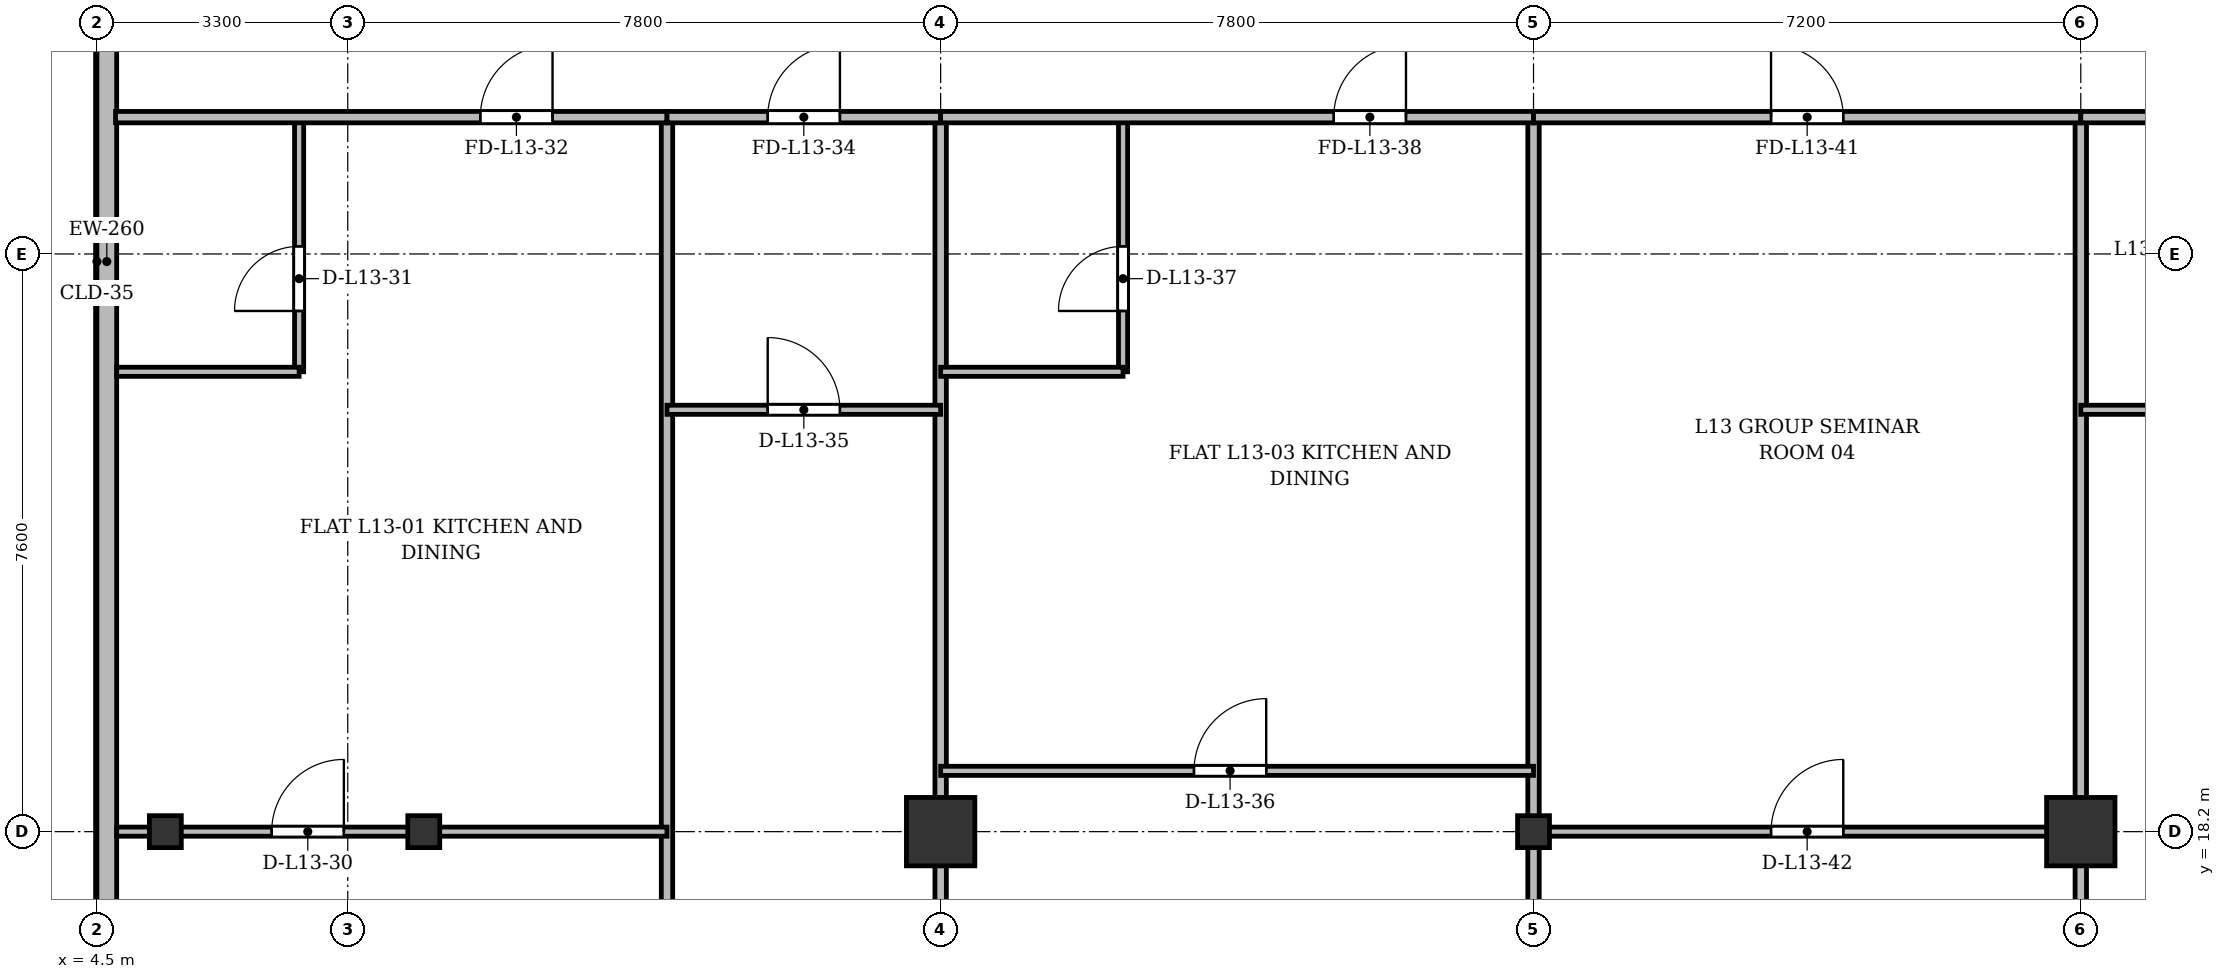
"""IFC4 building model, lengths in metres.
Left out: names, types, materials, properties, quantities, classifications, styles, units other than length and angle.
Written with IfcOpenShell. Run it as: python <this file> out.ifc"""

import sys

from ifc_helpers import new_model, si_unit, direction, frame, frame_2d, origin, origin_2d, place, context, subcontext, project, spatial, rectangle, i_section, extrude, source, transform, mapped, element, fill, save


model = new_model("IFC4")
c1 = context("Model", 3, precision=1e-05, world=origin(), true_north=direction((0.0, 1.0)))
c2 = subcontext(c1, "Body", "Model", "MODEL_VIEW")
j1 = project(units=[si_unit("LENGTHUNIT", "METRE"), si_unit("PLANEANGLEUNIT", "RADIAN")], contexts=[c1])
p1 = place(None, origin())
s1 = spatial("IfcSite", under=j1, at=p1, CompositionType="ELEMENT")
p2 = place(p1, origin())
s2 = spatial("IfcBuilding", under=s1, at=p2, CompositionType="ELEMENT")
p3 = place(p2, frame((0.0, 0.0, 52.3)))
s3 = spatial("IfcBuildingStorey", under=s2, at=p3, CompositionType="ELEMENT", Elevation=52.3)
m1 = source(origin(), c2, "Body", "SweptSolid", [
    extrude(i_section(OverallWidth=0.42, OverallDepth=0.42, WebThickness=0.026, FlangeThickness=0.04, at=origin_2d()), origin(), (0.0, 0.0, 1.0), 3.6),
])
for number, where, z_axis, x_axis in (
    (1, (5.4, 18.2, 0.0), (0.0, 0.0, 1.0), (1.0, 0.0, 0.0)),
    (2, (8.8, 18.2, 0.0), (0.0, 0.0, 1.0), (1.0, 0.0, 0.0)),
):
    element("IfcColumn", number, at=place(p3, frame(where, z_axis=z_axis, x_axis=x_axis)), inside=s3, PredefinedType="COLUMN", context=c2, shape_type="MappedRepresentation", body=[
        mapped(m1, transform((0.0, 0.0, 0.0), x_axis=(1.0, 0.0, 0.0), y_axis=(0.0, 1.0, 0.0), z_axis=(0.0, 0.0, 1.0), scale=1.0)),
    ])
m2 = source(origin(), c2, "Body", "SweptSolid", [
    extrude(rectangle(XDim=0.9, YDim=0.9, at=origin_2d()), origin(), (0.0, 0.0, 1.0), 3.6),
])
p4 = place(p3, frame((15.6, 18.2, 0.0), z_axis=(0.0, 0.0, 1.0), x_axis=(1.0, 0.0, 0.0)))
e3 = element("IfcColumn", 3, at=p4, inside=s3, PredefinedType="COLUMN", context=c2, shape_type="MappedRepresentation", body=[
    mapped(m2, transform((0.0, 0.0, 0.0), x_axis=(1.0, 0.0, 0.0), y_axis=(0.0, 1.0, 0.0), z_axis=(0.0, 0.0, 1.0), scale=1.0)),
])
p5 = place(p3, frame((23.4, 18.2, 0.0), z_axis=(0.0, 0.0, 1.0), x_axis=(1.0, 0.0, 0.0)))
e4 = element("IfcColumn", 4, at=p5, inside=s3, PredefinedType="COLUMN", context=c2, shape_type="MappedRepresentation", body=[
    mapped(m1, transform((0.0, 0.0, 0.0), x_axis=(1.0, 0.0, 0.0), y_axis=(0.0, 1.0, 0.0), z_axis=(0.0, 0.0, 1.0), scale=1.0)),
])
p6 = place(p3, frame((30.6, 18.2, 0.0), z_axis=(0.0, 0.0, 1.0), x_axis=(1.0, 0.0, 0.0)))
e5 = element("IfcColumn", 5, at=p6, inside=s3, PredefinedType="COLUMN", context=c2, shape_type="MappedRepresentation", body=[
    mapped(m2, transform((0.0, 0.0, 0.0), x_axis=(1.0, 0.0, 0.0), y_axis=(0.0, 1.0, 0.0), z_axis=(0.0, 0.0, 1.0), scale=1.0)),
])
p7 = place(p3, frame((4.63, 5.9, 0.0), z_axis=(0.0, 0.0, 1.0), x_axis=(0.0, 1.0, 0.0)))
e6 = element("IfcWall", 6, at=p7, inside=s3, PredefinedType="SOLIDWALL", context=c2, shape_type="SweptSolid", body=[
    extrude(rectangle(XDim=39.6, YDim=0.26, at=frame_2d((19.8, 0.0))), origin(), (0.0, 0.0, 1.0), 3.34),
])
p8 = place(p7, frame((1.45, 0.0, 0.92)))
e7 = element("IfcOpeningElement", 7, at=p8, cuts=e6, PredefinedType="OPENING", context=c2, shape_type="SweptSolid", body=[
    extrude(rectangle(XDim=1.2, YDim=1.65, at=frame_2d((0.6, 0.825))), frame((0.0, 0.14, 0.0), z_axis=(0.0, -1.0, 0.0), x_axis=(1.0, 0.0, 0.0)), (0.0, 0.0, 1.0), 0.28),
])
p9 = place(p7, frame((4.3, 0.0, 0.92)))
e8 = element("IfcOpeningElement", 8, at=p9, cuts=e6, PredefinedType="OPENING", context=c2, shape_type="SweptSolid", body=[
    extrude(rectangle(XDim=2.4, YDim=2.1, at=frame_2d((1.2, 1.05))), frame((0.0, 0.14, 0.0), z_axis=(0.0, -1.0, 0.0), x_axis=(1.0, 0.0, 0.0)), (0.0, 0.0, 1.0), 0.28),
])
p10 = place(p7, frame((8.5, 0.0, 0.92)))
e9 = element("IfcOpeningElement", 9, at=p10, cuts=e6, PredefinedType="OPENING", context=c2, shape_type="SweptSolid", body=[
    extrude(rectangle(XDim=2.4, YDim=2.1, at=frame_2d((1.2, 1.05))), frame((0.0, 0.14, 0.0), z_axis=(0.0, -1.0, 0.0), x_axis=(1.0, 0.0, 0.0)), (0.0, 0.0, 1.0), 0.28),
])
p11 = place(p7, frame((29.7, 0.0, 0.92)))
e10 = element("IfcOpeningElement", 10, at=p11, cuts=e6, PredefinedType="OPENING", context=c2, shape_type="SweptSolid", body=[
    extrude(rectangle(XDim=2.4, YDim=2.1, at=frame_2d((1.2, 1.05))), frame((0.0, 0.14, 0.0), z_axis=(0.0, -1.0, 0.0), x_axis=(1.0, 0.0, 0.0)), (0.0, 0.0, 1.0), 0.28),
])
p12 = place(p7, frame((33.9, 0.0, 0.92)))
e11 = element("IfcOpeningElement", 11, at=p12, cuts=e6, PredefinedType="OPENING", context=c2, shape_type="SweptSolid", body=[
    extrude(rectangle(XDim=1.2, YDim=1.65, at=frame_2d((0.6, 0.825))), frame((0.0, 0.14, 0.0), z_axis=(0.0, -1.0, 0.0), x_axis=(1.0, 0.0, 0.0)), (0.0, 0.0, 1.0), 0.28),
])
p13 = place(p7, frame((37.25, 0.0, 0.92)))
e12 = element("IfcOpeningElement", 12, at=p13, cuts=e6, PredefinedType="OPENING", context=c2, shape_type="SweptSolid", body=[
    extrude(rectangle(XDim=1.2, YDim=1.65, at=frame_2d((0.6, 0.825))), frame((0.0, 0.14, 0.0), z_axis=(0.0, -1.0, 0.0), x_axis=(1.0, 0.0, 0.0)), (0.0, 0.0, 1.0), 0.28),
])
p14 = place(p3, frame((12.0, 3.145, 0.0), z_axis=(0.0, 0.0, 1.0), x_axis=(0.0, 1.0, 0.0)))
e13 = element("IfcWall", 13, at=p14, inside=s3, PredefinedType="PARTITIONING", context=c2, shape_type="SweptSolid", body=[
    extrude(rectangle(XDim=24.455, YDim=0.15, at=frame_2d((12.228, 0.0))), origin(), (0.0, 0.0, 1.0), 2.69),
])
for number, where, z_axis, x_axis in (
    (14, (15.6, 3.145, 0.0), (0.0, 0.0, 1.0), (0.0, 1.0, 0.0)),
    (15, (23.4, 3.145, 0.0), (0.0, 0.0, 1.0), (0.0, 1.0, 0.0)),
    (16, (30.6, 3.145, 0.0), (0.0, 0.0, 1.0), (0.0, 1.0, 0.0)),
):
    element("IfcWall", number, at=place(p3, frame(where, z_axis=z_axis, x_axis=x_axis)), inside=s3, PredefinedType="PARTITIONING", context=c2, shape_type="SweptSolid", body=[
        extrude(rectangle(XDim=24.455, YDim=0.15, at=frame_2d((12.228, 0.0))), origin(), (0.0, 0.0, 1.0), 2.752),
    ])
p15 = place(p3, frame((4.76, 18.2, 0.0), z_axis=(0.0, 0.0, 1.0), x_axis=(1.0, 0.0, 0.0)))
e17 = element("IfcWall", 17, at=p15, inside=s3, PredefinedType="PARTITIONING", context=c2, shape_type="SweptSolid", body=[
    extrude(rectangle(XDim=7.24, YDim=0.12, at=frame_2d((3.62, 0.0))), origin(), (0.0, 0.0, 1.0), 2.69),
])
p16 = place(p15, frame((2.039, 0.0, 0.0)))
e18 = element("IfcOpeningElement", 18, at=p16, cuts=e17, PredefinedType="OPENING", context=c2, shape_type="SweptSolid", body=[
    extrude(rectangle(XDim=0.95, YDim=2.15, at=frame_2d((0.475, 1.075))), frame((0.0, 0.07, 0.0), z_axis=(0.0, -1.0, 0.0), x_axis=(1.0, 0.0, 0.0)), (0.0, 0.0, 1.0), 0.14),
])
p17 = place(p3, frame((7.16, 24.25, 0.0), z_axis=(0.0, 0.0, 1.0), x_axis=(0.0, 1.0, 0.0)))
e19 = element("IfcWall", 19, at=p17, inside=s3, PredefinedType="PARTITIONING", context=c2, shape_type="SweptSolid", body=[
    extrude(rectangle(XDim=3.35, YDim=0.12, at=frame_2d((1.675, 0.0))), origin(), (0.0, 0.0, 1.0), 2.94),
])
p18 = place(p17, frame((0.8, 0.0, 0.0)))
e20 = element("IfcOpeningElement", 20, at=p18, cuts=e19, PredefinedType="OPENING", context=c2, shape_type="SweptSolid", body=[
    extrude(rectangle(XDim=0.85, YDim=2.1, at=frame_2d((0.425, 1.05))), frame((0.0, 0.07, 0.0), z_axis=(0.0, -1.0, 0.0), x_axis=(1.0, 0.0, 0.0)), (0.0, 0.0, 1.0), 0.14),
])
p19 = place(p3, frame((4.76, 24.25, 0.0), z_axis=(0.0, 0.0, 1.0), x_axis=(1.0, 0.0, 0.0)))
e21 = element("IfcWall", 21, at=p19, inside=s3, PredefinedType="PARTITIONING", context=c2, shape_type="SweptSolid", body=[
    extrude(rectangle(XDim=2.4, YDim=0.12, at=frame_2d((1.2, 0.0))), origin(), (0.0, 0.0, 1.0), 2.752),
])
p20 = place(p3, frame((4.745, 27.6, 0.0), z_axis=(0.0, 0.0, 1.0), x_axis=(1.0, 0.0, 0.0)))
e22 = element("IfcWall", 22, at=p20, inside=s3, PredefinedType="PARTITIONING", context=c2, shape_type="SweptSolid", body=[
    extrude(rectangle(XDim=7.255, YDim=0.15, at=frame_2d((3.627, 0.0))), origin(), (0.0, 0.0, 1.0), 2.752),
])
p21 = place(p20, frame((4.799, 0.0, 0.0)))
e23 = element("IfcOpeningElement", 23, at=p21, cuts=e22, PredefinedType="OPENING", context=c2, shape_type="SweptSolid", body=[
    extrude(rectangle(XDim=0.95, YDim=2.15, at=frame_2d((0.475, 1.075))), frame((0.0, 0.085, 0.0), z_axis=(0.0, -1.0, 0.0), x_axis=(1.0, 0.0, 0.0)), (0.0, 0.0, 1.0), 0.17),
])
p22 = place(p3, frame((12.0, 27.6, 0.0), z_axis=(0.0, 0.0, 1.0), x_axis=(1.0, 0.0, 0.0)))
e24 = element("IfcWall", 24, at=p22, inside=s3, PredefinedType="PARTITIONING", context=c2, shape_type="SweptSolid", body=[
    extrude(rectangle(XDim=3.6, YDim=0.15, at=frame_2d((1.8, 0.0))), origin(), (0.0, 0.0, 1.0), 2.752),
])
p23 = place(p22, frame((1.325, 0.0, 0.0)))
e25 = element("IfcOpeningElement", 25, at=p23, cuts=e24, PredefinedType="OPENING", context=c2, shape_type="SweptSolid", body=[
    extrude(rectangle(XDim=0.95, YDim=2.15, at=frame_2d((0.475, 1.075))), frame((0.0, 0.085, 0.0), z_axis=(0.0, -1.0, 0.0), x_axis=(1.0, 0.0, 0.0)), (0.0, 0.0, 1.0), 0.17),
])
p24 = place(p3, frame((12.0, 23.75, 0.0), z_axis=(0.0, 0.0, 1.0), x_axis=(1.0, 0.0, 0.0)))
e26 = element("IfcWall", 26, at=p24, inside=s3, PredefinedType="PARTITIONING", context=c2, shape_type="SweptSolid", body=[
    extrude(rectangle(XDim=3.6, YDim=0.12, at=frame_2d((1.8, 0.0))), origin(), (0.0, 0.0, 1.0), 2.752),
])
p25 = place(p24, frame((1.325, 0.0, 0.0)))
e27 = element("IfcOpeningElement", 27, at=p25, cuts=e26, PredefinedType="OPENING", context=c2, shape_type="SweptSolid", body=[
    extrude(rectangle(XDim=0.95, YDim=2.15, at=frame_2d((0.475, 1.075))), frame((0.0, 0.07, 0.0), z_axis=(0.0, -1.0, 0.0), x_axis=(1.0, 0.0, 0.0)), (0.0, 0.0, 1.0), 0.14),
])
p26 = place(p3, frame((15.6, 19.0, 0.0), z_axis=(0.0, 0.0, 1.0), x_axis=(1.0, 0.0, 0.0)))
e28 = element("IfcWall", 28, at=p26, inside=s3, PredefinedType="PARTITIONING", context=c2, shape_type="SweptSolid", body=[
    extrude(rectangle(XDim=7.8, YDim=0.12, at=frame_2d((3.9, 0.0))), origin(), (0.0, 0.0, 1.0), 2.752),
])
p27 = place(p26, frame((3.333, 0.0, 0.0)))
e29 = element("IfcOpeningElement", 29, at=p27, cuts=e28, PredefinedType="OPENING", context=c2, shape_type="SweptSolid", body=[
    extrude(rectangle(XDim=0.95, YDim=2.15, at=frame_2d((0.475, 1.075))), frame((0.0, 0.07, 0.0), z_axis=(0.0, -1.0, 0.0), x_axis=(1.0, 0.0, 0.0)), (0.0, 0.0, 1.0), 0.14),
])
p28 = place(p3, frame((18.0, 24.25, 0.0), z_axis=(0.0, 0.0, 1.0), x_axis=(0.0, 1.0, 0.0)))
e30 = element("IfcWall", 30, at=p28, inside=s3, PredefinedType="PARTITIONING", context=c2, shape_type="SweptSolid", body=[
    extrude(rectangle(XDim=3.35, YDim=0.12, at=frame_2d((1.675, 0.0))), origin(), (0.0, 0.0, 1.0), 2.94),
])
p29 = place(p28, frame((0.8, 0.0, 0.0)))
e31 = element("IfcOpeningElement", 31, at=p29, cuts=e30, PredefinedType="OPENING", context=c2, shape_type="SweptSolid", body=[
    extrude(rectangle(XDim=0.85, YDim=2.1, at=frame_2d((0.425, 1.05))), frame((0.0, 0.07, 0.0), z_axis=(0.0, -1.0, 0.0), x_axis=(1.0, 0.0, 0.0)), (0.0, 0.0, 1.0), 0.14),
])
p30 = place(p3, frame((15.6, 24.25, 0.0), z_axis=(0.0, 0.0, 1.0), x_axis=(1.0, 0.0, 0.0)))
e32 = element("IfcWall", 32, at=p30, inside=s3, PredefinedType="PARTITIONING", context=c2, shape_type="SweptSolid", body=[
    extrude(rectangle(XDim=2.4, YDim=0.12, at=frame_2d((1.2, 0.0))), origin(), (0.0, 0.0, 1.0), 2.752),
])
p31 = place(p3, frame((15.6, 27.6, 0.0), z_axis=(0.0, 0.0, 1.0), x_axis=(1.0, 0.0, 0.0)))
e33 = element("IfcWall", 33, at=p31, inside=s3, PredefinedType="PARTITIONING", context=c2, shape_type="SweptSolid", body=[
    extrude(rectangle(XDim=7.8, YDim=0.15, at=frame_2d((3.9, 0.0))), origin(), (0.0, 0.0, 1.0), 2.752),
])
p32 = place(p31, frame((5.172, 0.0, 0.0)))
e34 = element("IfcOpeningElement", 34, at=p32, cuts=e33, PredefinedType="OPENING", context=c2, shape_type="SweptSolid", body=[
    extrude(rectangle(XDim=0.95, YDim=2.15, at=frame_2d((0.475, 1.075))), frame((0.0, 0.085, 0.0), z_axis=(0.0, -1.0, 0.0), x_axis=(1.0, 0.0, 0.0)), (0.0, 0.0, 1.0), 0.17),
])
p33 = place(p3, frame((23.4, 27.6, 0.0), z_axis=(0.0, 0.0, 1.0), x_axis=(1.0, 0.0, 0.0)))
e35 = element("IfcWall", 35, at=p33, inside=s3, PredefinedType="PARTITIONING", context=c2, shape_type="SweptSolid", body=[
    extrude(rectangle(XDim=7.2, YDim=0.15, at=frame_2d((3.6, 0.0))), origin(), (0.0, 0.0, 1.0), 2.752),
])
p34 = place(p33, frame((3.125, 0.0, 0.0)))
e36 = element("IfcOpeningElement", 36, at=p34, cuts=e35, PredefinedType="OPENING", context=c2, shape_type="SweptSolid", body=[
    extrude(rectangle(XDim=0.95, YDim=2.15, at=frame_2d((0.475, 1.075))), frame((0.0, 0.085, 0.0), z_axis=(0.0, -1.0, 0.0), x_axis=(1.0, 0.0, 0.0)), (0.0, 0.0, 1.0), 0.17),
])
p35 = place(p3, frame((23.4, 18.2, 0.0), z_axis=(0.0, 0.0, 1.0), x_axis=(1.0, 0.0, 0.0)))
e37 = element("IfcWall", 37, at=p35, inside=s3, PredefinedType="PARTITIONING", context=c2, shape_type="SweptSolid", body=[
    extrude(rectangle(XDim=7.2, YDim=0.12, at=frame_2d((3.6, 0.0))), origin(), (0.0, 0.0, 1.0), 2.69),
])
p36 = place(p35, frame((3.125, 0.0, 0.0)))
e38 = element("IfcOpeningElement", 38, at=p36, cuts=e37, PredefinedType="OPENING", context=c2, shape_type="SweptSolid", body=[
    extrude(rectangle(XDim=0.95, YDim=2.15, at=frame_2d((0.475, 1.075))), frame((0.0, 0.07, 0.0), z_axis=(0.0, -1.0, 0.0), x_axis=(1.0, 0.0, 0.0)), (0.0, 0.0, 1.0), 0.14),
])
p37 = place(p3, frame((30.6, 27.6, 0.0), z_axis=(0.0, 0.0, 1.0), x_axis=(1.0, 0.0, 0.0)))
e39 = element("IfcWall", 39, at=p37, inside=s3, PredefinedType="PARTITIONING", context=c2, shape_type="SweptSolid", body=[
    extrude(rectangle(XDim=8.4, YDim=0.15, at=frame_2d((4.2, 0.0))), origin(), (0.0, 0.0, 1.0), 2.752),
])
p38 = place(p37, frame((3.635, 0.0, 0.0)))
e40 = element("IfcOpeningElement", 40, at=p38, cuts=e39, PredefinedType="OPENING", context=c2, shape_type="SweptSolid", body=[
    extrude(rectangle(XDim=0.95, YDim=2.15, at=frame_2d((0.475, 1.075))), frame((0.0, 0.085, 0.0), z_axis=(0.0, -1.0, 0.0), x_axis=(1.0, 0.0, 0.0)), (0.0, 0.0, 1.0), 0.17),
])
p39 = place(p3, frame((30.6, 23.75, 0.0), z_axis=(0.0, 0.0, 1.0), x_axis=(1.0, 0.0, 0.0)))
e41 = element("IfcWall", 41, at=p39, inside=s3, PredefinedType="PARTITIONING", context=c2, shape_type="SweptSolid", body=[
    extrude(rectangle(XDim=8.4, YDim=0.12, at=frame_2d((4.2, 0.0))), origin(), (0.0, 0.0, 1.0), 2.752),
])
p40 = place(p39, frame((3.635, 0.0, 0.0)))
e42 = element("IfcOpeningElement", 42, at=p40, cuts=e41, PredefinedType="OPENING", context=c2, shape_type="SweptSolid", body=[
    extrude(rectangle(XDim=0.95, YDim=2.15, at=frame_2d((0.475, 1.075))), frame((0.0, 0.07, 0.0), z_axis=(0.0, -1.0, 0.0), x_axis=(1.0, 0.0, 0.0)), (0.0, 0.0, 1.0), 0.14),
])
m3 = source(origin(), c2, "Body", "SweptSolid", [
    extrude(rectangle(XDim=0.95, YDim=2.15, at=frame_2d((0.475, 1.075))), frame((0.0, 0.025, 0.0), z_axis=(0.0, -1.0, 0.0), x_axis=(1.0, 0.0, 0.0)), (0.0, 0.0, 1.0), 0.05),
])
p41 = place(p16, origin())
e43 = element("IfcDoor", 43, at=p41, inside=s3, OperationType="SINGLE_SWING_RIGHT", PredefinedType="DOOR", context=c2, shape_type="MappedRepresentation", body=[
    mapped(m3, transform((0.0, 0.0, 0.0), x_axis=(1.0, 0.0, 0.0), y_axis=(0.0, 1.0, 0.0), z_axis=(0.0, 0.0, 1.0), scale=1.0)),
])
fill(e18, e43)
m4 = source(origin(), c2, "Body", "SweptSolid", [
    extrude(rectangle(XDim=0.85, YDim=2.1, at=frame_2d((0.425, 1.05))), frame((0.0, 0.025, 0.0), z_axis=(0.0, -1.0, 0.0), x_axis=(1.0, 0.0, 0.0)), (0.0, 0.0, 1.0), 0.05),
])
p42 = place(p18, origin())
e44 = element("IfcDoor", 44, at=p42, inside=s3, OperationType="SINGLE_SWING_LEFT", PredefinedType="DOOR", context=c2, shape_type="MappedRepresentation", body=[
    mapped(m4, transform((0.0, 0.0, 0.0), x_axis=(1.0, 0.0, 0.0), y_axis=(0.0, 1.0, 0.0), z_axis=(0.0, 0.0, 1.0), scale=1.0)),
])
fill(e20, e44)
p43 = place(p21, origin())
e45 = element("IfcDoor", 45, at=p43, inside=s3, OperationType="SINGLE_SWING_RIGHT", PredefinedType="DOOR", context=c2, shape_type="MappedRepresentation", body=[
    mapped(m3, transform((0.0, 0.0, 0.0), x_axis=(1.0, 0.0, 0.0), y_axis=(0.0, 1.0, 0.0), z_axis=(0.0, 0.0, 1.0), scale=1.0)),
])
fill(e23, e45)
p44 = place(p23, origin())
e46 = element("IfcDoor", 46, at=p44, inside=s3, OperationType="SINGLE_SWING_RIGHT", PredefinedType="DOOR", context=c2, shape_type="MappedRepresentation", body=[
    mapped(m3, transform((0.0, 0.0, 0.0), x_axis=(1.0, 0.0, 0.0), y_axis=(0.0, 1.0, 0.0), z_axis=(0.0, 0.0, 1.0), scale=1.0)),
])
fill(e25, e46)
p45 = place(p25, origin())
e47 = element("IfcDoor", 47, at=p45, inside=s3, OperationType="SINGLE_SWING_LEFT", PredefinedType="DOOR", context=c2, shape_type="MappedRepresentation", body=[
    mapped(m3, transform((0.0, 0.0, 0.0), x_axis=(1.0, 0.0, 0.0), y_axis=(0.0, 1.0, 0.0), z_axis=(0.0, 0.0, 1.0), scale=1.0)),
])
fill(e27, e47)
p46 = place(p27, origin())
e48 = element("IfcDoor", 48, at=p46, inside=s3, OperationType="SINGLE_SWING_RIGHT", PredefinedType="DOOR", context=c2, shape_type="MappedRepresentation", body=[
    mapped(m3, transform((0.0, 0.0, 0.0), x_axis=(1.0, 0.0, 0.0), y_axis=(0.0, 1.0, 0.0), z_axis=(0.0, 0.0, 1.0), scale=1.0)),
])
fill(e29, e48)
p47 = place(p29, origin())
e49 = element("IfcDoor", 49, at=p47, inside=s3, OperationType="SINGLE_SWING_LEFT", PredefinedType="DOOR", context=c2, shape_type="MappedRepresentation", body=[
    mapped(m4, transform((0.0, 0.0, 0.0), x_axis=(1.0, 0.0, 0.0), y_axis=(0.0, 1.0, 0.0), z_axis=(0.0, 0.0, 1.0), scale=1.0)),
])
fill(e31, e49)
p48 = place(p32, origin())
e50 = element("IfcDoor", 50, at=p48, inside=s3, OperationType="SINGLE_SWING_RIGHT", PredefinedType="DOOR", context=c2, shape_type="MappedRepresentation", body=[
    mapped(m3, transform((0.0, 0.0, 0.0), x_axis=(1.0, 0.0, 0.0), y_axis=(0.0, 1.0, 0.0), z_axis=(0.0, 0.0, 1.0), scale=1.0)),
])
fill(e34, e50)
p49 = place(p34, origin())
e51 = element("IfcDoor", 51, at=p49, inside=s3, OperationType="SINGLE_SWING_LEFT", PredefinedType="DOOR", context=c2, shape_type="MappedRepresentation", body=[
    mapped(m3, transform((0.0, 0.0, 0.0), x_axis=(1.0, 0.0, 0.0), y_axis=(0.0, 1.0, 0.0), z_axis=(0.0, 0.0, 1.0), scale=1.0)),
])
fill(e36, e51)
p50 = place(p36, origin())
e52 = element("IfcDoor", 52, at=p50, inside=s3, OperationType="SINGLE_SWING_RIGHT", PredefinedType="DOOR", context=c2, shape_type="MappedRepresentation", body=[
    mapped(m3, transform((0.0, 0.0, 0.0), x_axis=(1.0, 0.0, 0.0), y_axis=(0.0, 1.0, 0.0), z_axis=(0.0, 0.0, 1.0), scale=1.0)),
])
fill(e38, e52)
save(model, sys.argv[1])
